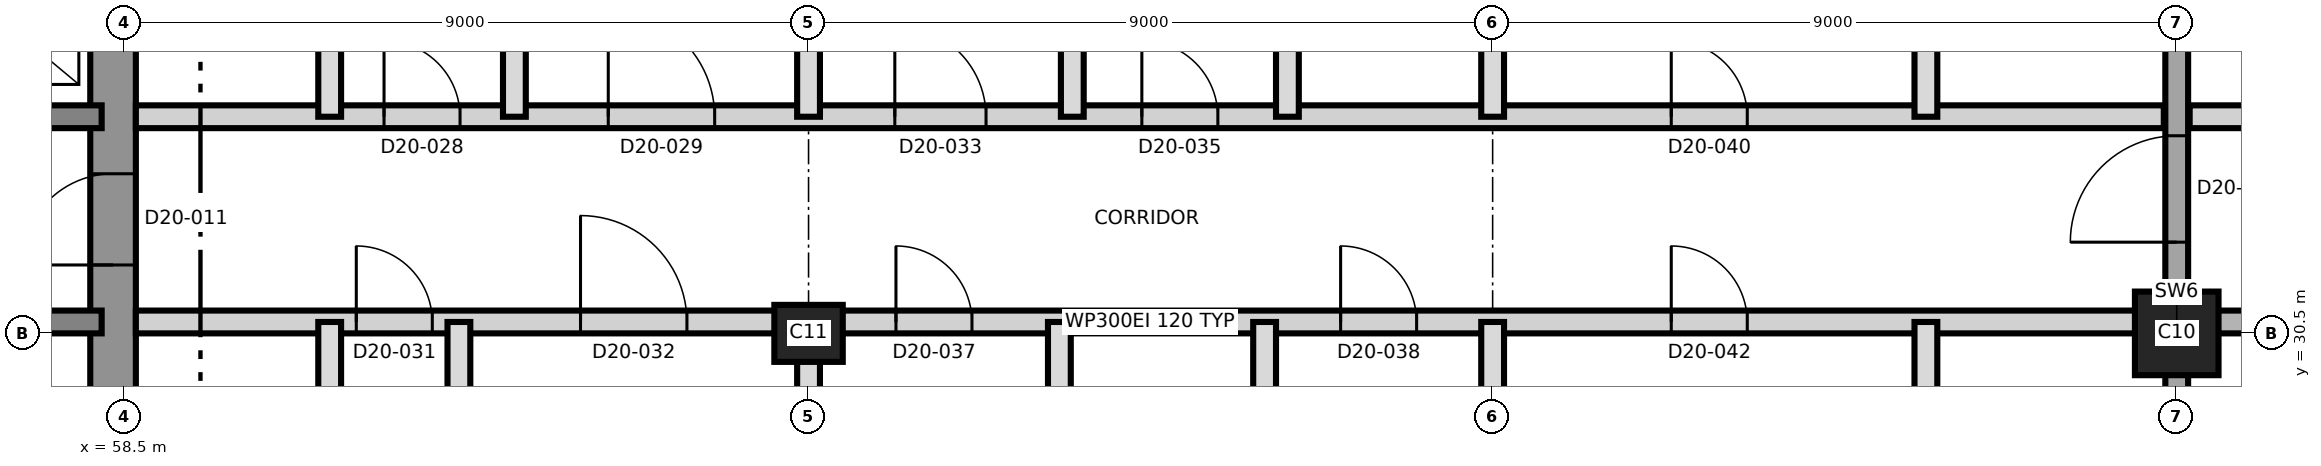
"""IFC4 building model, lengths in metres.
Left out: names, types, materials, properties, quantities, classifications, styles, units other than length and angle.
Written with IfcOpenShell. Run it as: python <this file> out.ifc"""

import sys

from ifc_helpers import new_model, si_unit, direction, frame, frame_2d, origin, origin_2d, place, context, subcontext, project, spatial, rectangle, extrude, element, fill, save


model = new_model("IFC4")
c1 = context("Model", 3, precision=1e-05, world=origin(), true_north=direction((0.0, 1.0)))
c2 = subcontext(c1, "Body", "Model", "MODEL_VIEW")
j1 = project(units=[si_unit("LENGTHUNIT", "METRE"), si_unit("PLANEANGLEUNIT", "RADIAN")], contexts=[c1])
p1 = place(None, origin())
s1 = spatial("IfcSite", under=j1, at=p1, CompositionType="ELEMENT")
p2 = place(p1, origin())
s2 = spatial("IfcBuilding", under=s1, at=p2, CompositionType="ELEMENT")
p3 = place(p2, frame((0.0, 0.0, 182.9)))
s3 = spatial("IfcBuildingStorey", under=s2, at=p3, CompositionType="ELEMENT", Elevation=182.9)
p4 = place(p3, frame((58.35, 21.2, 0.0), z_axis=(0.0, 0.0, 1.0), x_axis=(0.0, 1.0, 0.0)))
e1 = element("IfcWall", 1, at=p4, inside=s3, PredefinedType="SHEAR", context=c2, shape_type="SweptSolid", body=[
    extrude(rectangle(XDim=18.6, YDim=0.6, at=frame_2d((9.3, 0.0))), origin(), (0.0, 0.0, 1.0), 3.7),
])
p5 = place(p4, frame((10.2, 0.0, 0.0)))
e2 = element("IfcOpeningElement", 2, at=p5, cuts=e1, PredefinedType="OPENING", context=c2, shape_type="SweptSolid", body=[
    extrude(rectangle(XDim=1.2, YDim=2.1, at=frame_2d((0.6, 1.05))), frame((0.0, 0.31, 0.0), z_axis=(0.0, -1.0, 0.0), x_axis=(1.0, 0.0, 0.0)), (0.0, 0.0, 1.0), 0.62),
])
p6 = place(p3, frame((31.8, 30.65, 0.0), z_axis=(0.0, 0.0, 1.0), x_axis=(1.0, 0.0, 0.0)))
e3 = element("IfcWall", 3, at=p6, inside=s3, PredefinedType="SHEAR", context=c2, shape_type="SweptSolid", body=[
    extrude(rectangle(XDim=26.4, YDim=0.3, at=frame_2d((13.2, 0.0))), origin(), (0.0, 0.0, 1.0), 3.7),
])
p7 = place(p6, frame((24.7, 0.0, 0.0)))
e4 = element("IfcOpeningElement", 4, at=p7, cuts=e3, PredefinedType="OPENING", context=c2, shape_type="SweptSolid", body=[
    extrude(rectangle(XDim=1.0, YDim=2.1, at=frame_2d((0.5, 1.05))), frame((0.0, 0.16, 0.0), z_axis=(0.0, -1.0, 0.0), x_axis=(1.0, 0.0, 0.0)), (0.0, 0.0, 1.0), 0.32),
])
p8 = place(p6, frame((4.0, 0.0, 0.0)))
e5 = element("IfcOpeningElement", 5, at=p8, cuts=e3, PredefinedType="OPENING", context=c2, shape_type="SweptSolid", body=[
    extrude(rectangle(XDim=1.0, YDim=2.1, at=frame_2d((0.5, 1.05))), frame((0.0, 0.16, 0.0), z_axis=(0.0, -1.0, 0.0), x_axis=(1.0, 0.0, 0.0)), (0.0, 0.0, 1.0), 0.32),
])
p9 = place(p3, frame((31.8, 33.35, 0.0), z_axis=(0.0, 0.0, 1.0), x_axis=(1.0, 0.0, 0.0)))
e6 = element("IfcWall", 6, at=p9, inside=s3, PredefinedType="SHEAR", context=c2, shape_type="SweptSolid", body=[
    extrude(rectangle(XDim=26.4, YDim=0.3, at=frame_2d((13.2, 0.0))), origin(), (0.0, 0.0, 1.0), 3.7),
])
p10 = place(p9, frame((13.85, 0.0, 0.0)))
e7 = element("IfcOpeningElement", 7, at=p10, cuts=e6, PredefinedType="OPENING", context=c2, shape_type="SweptSolid", body=[
    extrude(rectangle(XDim=1.4, YDim=2.1, at=frame_2d((0.7, 1.05))), frame((0.0, 0.16, 0.0), z_axis=(0.0, -1.0, 0.0), x_axis=(1.0, 0.0, 0.0)), (0.0, 0.0, 1.0), 0.32),
])
p11 = place(p9, frame((5.325, 0.0, 0.0)))
e8 = element("IfcOpeningElement", 8, at=p11, cuts=e6, PredefinedType="OPENING", context=c2, shape_type="SweptSolid", body=[
    extrude(rectangle(XDim=1.2, YDim=2.1, at=frame_2d((0.6, 1.05))), frame((0.0, 0.16, 0.0), z_axis=(0.0, -1.0, 0.0), x_axis=(1.0, 0.0, 0.0)), (0.0, 0.0, 1.0), 0.32),
])
p12 = place(p9, frame((19.875, 0.0, 0.0)))
e9 = element("IfcOpeningElement", 9, at=p12, cuts=e6, PredefinedType="OPENING", context=c2, shape_type="SweptSolid", body=[
    extrude(rectangle(XDim=1.2, YDim=2.1, at=frame_2d((0.6, 1.05))), frame((0.0, 0.16, 0.0), z_axis=(0.0, -1.0, 0.0), x_axis=(1.0, 0.0, 0.0)), (0.0, 0.0, 1.0), 0.32),
])
p13 = place(p3, frame((67.5, 30.5, 0.0), z_axis=(0.0, 0.0, 1.0), x_axis=(1.0, 0.0, 0.0)))
e10 = element("IfcColumn", 10, at=p13, inside=s3, PredefinedType="COLUMN", context=c2, shape_type="SweptSolid", body=[
    extrude(rectangle(XDim=0.9, YDim=0.75, at=origin_2d()), origin(), (0.0, 0.0, 1.0), 3.7),
])
p14 = place(p3, frame((85.5, 30.5, 0.0), z_axis=(0.0, 0.0, 1.0), x_axis=(1.0, 0.0, 0.0)))
e11 = element("IfcColumn", 11, at=p14, inside=s3, PredefinedType="COLUMN", context=c2, shape_type="SweptSolid", body=[
    extrude(rectangle(XDim=1.1, YDim=1.1, at=origin_2d()), origin(), (0.0, 0.0, 1.0), 3.7),
])
p15 = place(p3, frame((85.5, 19.17, 0.0), z_axis=(0.0, 0.0, 1.0), x_axis=(0.0, 1.0, 0.0)))
e12 = element("IfcWall", 12, at=p15, inside=s3, PredefinedType="SHEAR", context=c2, shape_type="SweptSolid", body=[
    extrude(rectangle(XDim=22.66, YDim=0.3, at=frame_2d((11.33, 0.0))), origin(), (0.0, 0.0, 1.0), 3.7),
])
p16 = place(p15, frame((12.53, 0.0, 0.0)))
e13 = element("IfcOpeningElement", 13, at=p16, cuts=e12, PredefinedType="OPENING", context=c2, shape_type="SweptSolid", body=[
    extrude(rectangle(XDim=1.4, YDim=2.1, at=frame_2d((0.7, 1.05))), frame((0.0, 0.16, 0.0), z_axis=(0.0, -1.0, 0.0), x_axis=(1.0, 0.0, 0.0)), (0.0, 0.0, 1.0), 0.32),
])
p17 = place(p3, frame((58.65, 30.65, 0.0), z_axis=(0.0, 0.0, 1.0), x_axis=(1.0, 0.0, 0.0)))
e14 = element("IfcWall", 14, at=p17, inside=s3, PredefinedType="PARTITIONING", context=c2, shape_type="SweptSolid", body=[
    extrude(rectangle(XDim=26.68, YDim=0.3, at=frame_2d((13.34, 0.0))), origin(), (0.0, 0.0, 1.0), 3.4),
])
p18 = place(p17, frame((2.9, 0.0, 0.0)))
e15 = element("IfcOpeningElement", 15, at=p18, cuts=e14, PredefinedType="OPENING", context=c2, shape_type="SweptSolid", body=[
    extrude(rectangle(XDim=1.0, YDim=2.1, at=frame_2d((0.5, 1.05))), frame((0.0, 0.16, 0.0), z_axis=(0.0, -1.0, 0.0), x_axis=(1.0, 0.0, 0.0)), (0.0, 0.0, 1.0), 0.32),
])
p19 = place(p17, frame((5.85, 0.0, 0.0)))
e16 = element("IfcOpeningElement", 16, at=p19, cuts=e14, PredefinedType="OPENING", context=c2, shape_type="SweptSolid", body=[
    extrude(rectangle(XDim=1.4, YDim=2.1, at=frame_2d((0.7, 1.05))), frame((0.0, 0.16, 0.0), z_axis=(0.0, -1.0, 0.0), x_axis=(1.0, 0.0, 0.0)), (0.0, 0.0, 1.0), 0.32),
])
p20 = place(p17, frame((10.0, 0.0, 0.0)))
e17 = element("IfcOpeningElement", 17, at=p20, cuts=e14, PredefinedType="OPENING", context=c2, shape_type="SweptSolid", body=[
    extrude(rectangle(XDim=1.0, YDim=2.1, at=frame_2d((0.5, 1.05))), frame((0.0, 0.16, 0.0), z_axis=(0.0, -1.0, 0.0), x_axis=(1.0, 0.0, 0.0)), (0.0, 0.0, 1.0), 0.32),
])
p21 = place(p17, frame((15.85, 0.0, 0.0)))
e18 = element("IfcOpeningElement", 18, at=p21, cuts=e14, PredefinedType="OPENING", context=c2, shape_type="SweptSolid", body=[
    extrude(rectangle(XDim=1.0, YDim=2.1, at=frame_2d((0.5, 1.05))), frame((0.0, 0.16, 0.0), z_axis=(0.0, -1.0, 0.0), x_axis=(1.0, 0.0, 0.0)), (0.0, 0.0, 1.0), 0.32),
])
p22 = place(p17, frame((20.2, 0.0, 0.0)))
e19 = element("IfcOpeningElement", 19, at=p22, cuts=e14, PredefinedType="OPENING", context=c2, shape_type="SweptSolid", body=[
    extrude(rectangle(XDim=1.0, YDim=2.1, at=frame_2d((0.5, 1.05))), frame((0.0, 0.16, 0.0), z_axis=(0.0, -1.0, 0.0), x_axis=(1.0, 0.0, 0.0)), (0.0, 0.0, 1.0), 0.32),
])
p23 = place(p3, frame((85.67, 30.65, 0.0), z_axis=(0.0, 0.0, 1.0), x_axis=(1.0, 0.0, 0.0)))
e20 = element("IfcWall", 20, at=p23, inside=s3, PredefinedType="SHEAR", context=c2, shape_type="SweptSolid", body=[
    extrude(rectangle(XDim=9.58, YDim=0.3, at=frame_2d((4.79, 0.0))), origin(), (0.0, 0.0, 1.0), 3.4),
])
p24 = place(p23, frame((2.08, 0.0, 0.0)))
e21 = element("IfcOpeningElement", 21, at=p24, cuts=e20, PredefinedType="OPENING", context=c2, shape_type="SweptSolid", body=[
    extrude(rectangle(XDim=1.2, YDim=2.1, at=frame_2d((0.6, 1.05))), frame((0.0, 0.16, 0.0), z_axis=(0.0, -1.0, 0.0), x_axis=(1.0, 0.0, 0.0)), (0.0, 0.0, 1.0), 0.32),
])
p25 = place(p23, frame((5.63, 0.0, 0.0)))
e22 = element("IfcOpeningElement", 22, at=p25, cuts=e20, PredefinedType="OPENING", context=c2, shape_type="SweptSolid", body=[
    extrude(rectangle(XDim=1.0, YDim=2.1, at=frame_2d((0.5, 1.05))), frame((0.0, 0.16, 0.0), z_axis=(0.0, -1.0, 0.0), x_axis=(1.0, 0.0, 0.0)), (0.0, 0.0, 1.0), 0.32),
])
p26 = place(p3, frame((58.65, 33.35, 0.0), z_axis=(0.0, 0.0, 1.0), x_axis=(1.0, 0.0, 0.0)))
e23 = element("IfcWall", 23, at=p26, inside=s3, PredefinedType="PARTITIONING", context=c2, shape_type="SweptSolid", body=[
    extrude(rectangle(XDim=26.68, YDim=0.3, at=frame_2d((13.34, 0.0))), origin(), (0.0, 0.0, 1.0), 3.4),
])
p27 = place(p26, frame((3.265, 0.0, 0.0)))
e24 = element("IfcOpeningElement", 24, at=p27, cuts=e23, PredefinedType="OPENING", context=c2, shape_type="SweptSolid", body=[
    extrude(rectangle(XDim=1.0, YDim=2.1, at=frame_2d((0.5, 1.05))), frame((0.0, 0.16, 0.0), z_axis=(0.0, -1.0, 0.0), x_axis=(1.0, 0.0, 0.0)), (0.0, 0.0, 1.0), 0.32),
])
p28 = place(p26, frame((6.215, 0.0, 0.0)))
e25 = element("IfcOpeningElement", 25, at=p28, cuts=e23, PredefinedType="OPENING", context=c2, shape_type="SweptSolid", body=[
    extrude(rectangle(XDim=1.4, YDim=2.1, at=frame_2d((0.7, 1.05))), frame((0.0, 0.16, 0.0), z_axis=(0.0, -1.0, 0.0), x_axis=(1.0, 0.0, 0.0)), (0.0, 0.0, 1.0), 0.32),
])
p29 = place(p26, frame((9.985, 0.0, 0.0)))
e26 = element("IfcOpeningElement", 26, at=p29, cuts=e23, PredefinedType="OPENING", context=c2, shape_type="SweptSolid", body=[
    extrude(rectangle(XDim=1.2, YDim=2.1, at=frame_2d((0.6, 1.05))), frame((0.0, 0.16, 0.0), z_axis=(0.0, -1.0, 0.0), x_axis=(1.0, 0.0, 0.0)), (0.0, 0.0, 1.0), 0.32),
])
p30 = place(p26, frame((13.235, 0.0, 0.0)))
e27 = element("IfcOpeningElement", 27, at=p30, cuts=e23, PredefinedType="OPENING", context=c2, shape_type="SweptSolid", body=[
    extrude(rectangle(XDim=1.0, YDim=2.1, at=frame_2d((0.5, 1.05))), frame((0.0, 0.16, 0.0), z_axis=(0.0, -1.0, 0.0), x_axis=(1.0, 0.0, 0.0)), (0.0, 0.0, 1.0), 0.32),
])
p31 = place(p26, frame((20.2, 0.0, 0.0)))
e28 = element("IfcOpeningElement", 28, at=p31, cuts=e23, PredefinedType="OPENING", context=c2, shape_type="SweptSolid", body=[
    extrude(rectangle(XDim=1.0, YDim=2.1, at=frame_2d((0.5, 1.05))), frame((0.0, 0.16, 0.0), z_axis=(0.0, -1.0, 0.0), x_axis=(1.0, 0.0, 0.0)), (0.0, 0.0, 1.0), 0.32),
])
p32 = place(p3, frame((85.67, 33.35, 0.0), z_axis=(0.0, 0.0, 1.0), x_axis=(1.0, 0.0, 0.0)))
e29 = element("IfcWall", 29, at=p32, inside=s3, PredefinedType="PARTITIONING", context=c2, shape_type="SweptSolid", body=[
    extrude(rectangle(XDim=9.58, YDim=0.3, at=frame_2d((4.79, 0.0))), origin(), (0.0, 0.0, 1.0), 3.4),
])
p33 = place(p32, frame((1.83, 0.0, 0.0)))
e30 = element("IfcOpeningElement", 30, at=p33, cuts=e29, PredefinedType="OPENING", context=c2, shape_type="SweptSolid", body=[
    extrude(rectangle(XDim=1.0, YDim=2.1, at=frame_2d((0.5, 1.05))), frame((0.0, 0.16, 0.0), z_axis=(0.0, -1.0, 0.0), x_axis=(1.0, 0.0, 0.0)), (0.0, 0.0, 1.0), 0.32),
])
p34 = place(p32, frame((5.63, 0.0, 0.0)))
e31 = element("IfcOpeningElement", 31, at=p34, cuts=e29, PredefinedType="OPENING", context=c2, shape_type="SweptSolid", body=[
    extrude(rectangle(XDim=1.0, YDim=2.1, at=frame_2d((0.5, 1.05))), frame((0.0, 0.16, 0.0), z_axis=(0.0, -1.0, 0.0), x_axis=(1.0, 0.0, 0.0)), (0.0, 0.0, 1.0), 0.32),
])
for number, where, z_axis, x_axis in (
    (32, (61.2, 27.45, 0.0), (0.0, 0.0, 1.0), (0.0, 1.0, 0.0)),
    (33, (61.2, 33.35, 0.0), (0.0, 0.0, 1.0), (0.0, 1.0, 0.0)),
):
    element("IfcWall", number, at=place(p3, frame(where, z_axis=z_axis, x_axis=x_axis)), inside=s3, PredefinedType="PARTITIONING", context=c2, shape_type="SweptSolid", body=[
        extrude(rectangle(XDim=3.2, YDim=0.3, at=frame_2d((1.6, 0.0))), origin(), (0.0, 0.0, 1.0), 3.4),
    ])
p35 = place(p3, frame((62.9, 19.17, 0.0), z_axis=(0.0, 0.0, 1.0), x_axis=(0.0, 1.0, 0.0)))
e34 = element("IfcWall", 34, at=p35, inside=s3, PredefinedType="PARTITIONING", context=c2, shape_type="SweptSolid", body=[
    extrude(rectangle(XDim=11.48, YDim=0.3, at=frame_2d((5.74, 0.0))), origin(), (0.0, 0.0, 1.0), 3.4),
])
p36 = place(p3, frame((63.63, 33.35, 0.0), z_axis=(0.0, 0.0, 1.0), x_axis=(0.0, 1.0, 0.0)))
e35 = element("IfcWall", 35, at=p36, inside=s3, PredefinedType="PARTITIONING", context=c2, shape_type="SweptSolid", body=[
    extrude(rectangle(XDim=8.62, YDim=0.3, at=frame_2d((4.31, 0.0))), origin(), (0.0, 0.0, 1.0), 3.4),
])
p37 = place(p3, frame((67.5, 19.17, 0.0), z_axis=(0.0, 0.0, 1.0), x_axis=(0.0, 1.0, 0.0)))
e36 = element("IfcWall", 36, at=p37, inside=s3, PredefinedType="PARTITIONING", context=c2, shape_type="SweptSolid", body=[
    extrude(rectangle(XDim=11.48, YDim=0.3, at=frame_2d((5.74, 0.0))), origin(), (0.0, 0.0, 1.0), 3.4),
])
p38 = place(p3, frame((67.5, 33.35, 0.0), z_axis=(0.0, 0.0, 1.0), x_axis=(0.0, 1.0, 0.0)))
e37 = element("IfcWall", 37, at=p38, inside=s3, PredefinedType="PARTITIONING", context=c2, shape_type="SweptSolid", body=[
    extrude(rectangle(XDim=8.66, YDim=0.3, at=frame_2d((4.33, 0.0))), origin(), (0.0, 0.0, 1.0), 3.4),
])
p39 = place(p3, frame((70.8, 27.45, 0.0), z_axis=(0.0, 0.0, 1.0), x_axis=(0.0, 1.0, 0.0)))
e38 = element("IfcWall", 38, at=p39, inside=s3, PredefinedType="PARTITIONING", context=c2, shape_type="SweptSolid", body=[
    extrude(rectangle(XDim=3.2, YDim=0.3, at=frame_2d((1.6, 0.0))), origin(), (0.0, 0.0, 1.0), 3.4),
])
p40 = place(p3, frame((70.97, 33.35, 0.0), z_axis=(0.0, 0.0, 1.0), x_axis=(0.0, 1.0, 0.0)))
e39 = element("IfcWall", 39, at=p40, inside=s3, PredefinedType="PARTITIONING", context=c2, shape_type="SweptSolid", body=[
    extrude(rectangle(XDim=8.66, YDim=0.3, at=frame_2d((4.33, 0.0))), origin(), (0.0, 0.0, 1.0), 3.4),
])
p41 = place(p3, frame((73.5, 19.17, 0.0), z_axis=(0.0, 0.0, 1.0), x_axis=(0.0, 1.0, 0.0)))
e40 = element("IfcWall", 40, at=p41, inside=s3, PredefinedType="PARTITIONING", context=c2, shape_type="SweptSolid", body=[
    extrude(rectangle(XDim=11.48, YDim=0.3, at=frame_2d((5.74, 0.0))), origin(), (0.0, 0.0, 1.0), 3.4),
])
p42 = place(p3, frame((73.8, 33.35, 0.0), z_axis=(0.0, 0.0, 1.0), x_axis=(0.0, 1.0, 0.0)))
e41 = element("IfcWall", 41, at=p42, inside=s3, PredefinedType="PARTITIONING", context=c2, shape_type="SweptSolid", body=[
    extrude(rectangle(XDim=3.2, YDim=0.3, at=frame_2d((1.6, 0.0))), origin(), (0.0, 0.0, 1.0), 3.4),
])
p43 = place(p3, frame((76.5, 19.17, 0.0), z_axis=(0.0, 0.0, 1.0), x_axis=(0.0, 1.0, 0.0)))
e42 = element("IfcWall", 42, at=p43, inside=s3, PredefinedType="PARTITIONING", context=c2, shape_type="SweptSolid", body=[
    extrude(rectangle(XDim=11.48, YDim=0.3, at=frame_2d((5.74, 0.0))), origin(), (0.0, 0.0, 1.0), 3.4),
])
p44 = place(p3, frame((76.5, 33.35, 0.0), z_axis=(0.0, 0.0, 1.0), x_axis=(0.0, 1.0, 0.0)))
e43 = element("IfcWall", 43, at=p44, inside=s3, PredefinedType="PARTITIONING", context=c2, shape_type="SweptSolid", body=[
    extrude(rectangle(XDim=8.66, YDim=0.3, at=frame_2d((4.33, 0.0))), origin(), (0.0, 0.0, 1.0), 3.4),
])
for number, where, z_axis, x_axis in (
    (44, (82.2, 27.15, 0.0), (0.0, 0.0, 1.0), (0.0, 1.0, 0.0)),
    (45, (82.2, 33.35, 0.0), (0.0, 0.0, 1.0), (0.0, 1.0, 0.0)),
):
    element("IfcWall", number, at=place(p3, frame(where, z_axis=z_axis, x_axis=x_axis)), inside=s3, PredefinedType="PARTITIONING", context=c2, shape_type="SweptSolid", body=[
        extrude(rectangle(XDim=3.5, YDim=0.3, at=frame_2d((1.75, 0.0))), origin(), (0.0, 0.0, 1.0), 3.4),
    ])
p45 = place(p5, origin())
e46 = element("IfcDoor", 46, at=p45, inside=s3, OperationType="SINGLE_SWING_LEFT", PredefinedType="DOOR", context=c2, shape_type="SweptSolid", body=[
    extrude(rectangle(XDim=1.2, YDim=2.1, at=frame_2d((0.6, 1.05))), frame((0.0, 0.025, 0.0), z_axis=(0.0, -1.0, 0.0), x_axis=(1.0, 0.0, 0.0)), (0.0, 0.0, 1.0), 0.05),
])
fill(e2, e46)
p46 = place(p27, origin())
e47 = element("IfcDoor", 47, at=p46, inside=s3, OperationType="SINGLE_SWING_LEFT", PredefinedType="DOOR", context=c2, shape_type="SweptSolid", body=[
    extrude(rectangle(XDim=1.0, YDim=2.1, at=frame_2d((0.5, 1.05))), frame((0.0, 0.025, 0.0), z_axis=(0.0, -1.0, 0.0), x_axis=(1.0, 0.0, 0.0)), (0.0, 0.0, 1.0), 0.05),
])
fill(e24, e47)
p47 = place(p28, origin())
e48 = element("IfcDoor", 48, at=p47, inside=s3, OperationType="SINGLE_SWING_RIGHT", PredefinedType="DOOR", context=c2, shape_type="SweptSolid", body=[
    extrude(rectangle(XDim=1.4, YDim=2.1, at=frame_2d((0.7, 1.05))), frame((0.0, 0.025, 0.0), z_axis=(0.0, -1.0, 0.0), x_axis=(1.0, 0.0, 0.0)), (0.0, 0.0, 1.0), 0.05),
])
fill(e25, e48)
p48 = place(p18, origin())
e49 = element("IfcDoor", 49, at=p48, inside=s3, OperationType="SINGLE_SWING_LEFT", PredefinedType="DOOR", context=c2, shape_type="SweptSolid", body=[
    extrude(rectangle(XDim=1.0, YDim=2.1, at=frame_2d((0.5, 1.05))), frame((0.0, 0.025, 0.0), z_axis=(0.0, -1.0, 0.0), x_axis=(1.0, 0.0, 0.0)), (0.0, 0.0, 1.0), 0.05),
])
fill(e15, e49)
p49 = place(p19, origin())
e50 = element("IfcDoor", 50, at=p49, inside=s3, OperationType="SINGLE_SWING_RIGHT", PredefinedType="DOOR", context=c2, shape_type="SweptSolid", body=[
    extrude(rectangle(XDim=1.4, YDim=2.1, at=frame_2d((0.7, 1.05))), frame((0.0, 0.025, 0.0), z_axis=(0.0, -1.0, 0.0), x_axis=(1.0, 0.0, 0.0)), (0.0, 0.0, 1.0), 0.05),
])
fill(e16, e50)
p50 = place(p29, origin())
e51 = element("IfcDoor", 51, at=p50, inside=s3, OperationType="SINGLE_SWING_LEFT", PredefinedType="DOOR", context=c2, shape_type="SweptSolid", body=[
    extrude(rectangle(XDim=1.2, YDim=2.1, at=frame_2d((0.6, 1.05))), frame((0.0, 0.025, 0.0), z_axis=(0.0, -1.0, 0.0), x_axis=(1.0, 0.0, 0.0)), (0.0, 0.0, 1.0), 0.05),
])
fill(e26, e51)
p51 = place(p30, origin())
e52 = element("IfcDoor", 52, at=p51, inside=s3, OperationType="SINGLE_SWING_LEFT", PredefinedType="DOOR", context=c2, shape_type="SweptSolid", body=[
    extrude(rectangle(XDim=1.0, YDim=2.1, at=frame_2d((0.5, 1.05))), frame((0.0, 0.025, 0.0), z_axis=(0.0, -1.0, 0.0), x_axis=(1.0, 0.0, 0.0)), (0.0, 0.0, 1.0), 0.05),
])
fill(e27, e52)
p52 = place(p20, origin())
e53 = element("IfcDoor", 53, at=p52, inside=s3, OperationType="SINGLE_SWING_LEFT", PredefinedType="DOOR", context=c2, shape_type="SweptSolid", body=[
    extrude(rectangle(XDim=1.0, YDim=2.1, at=frame_2d((0.5, 1.05))), frame((0.0, 0.025, 0.0), z_axis=(0.0, -1.0, 0.0), x_axis=(1.0, 0.0, 0.0)), (0.0, 0.0, 1.0), 0.05),
])
fill(e17, e53)
p53 = place(p21, origin())
e54 = element("IfcDoor", 54, at=p53, inside=s3, OperationType="SINGLE_SWING_RIGHT", PredefinedType="DOOR", context=c2, shape_type="SweptSolid", body=[
    extrude(rectangle(XDim=1.0, YDim=2.1, at=frame_2d((0.5, 1.05))), frame((0.0, 0.025, 0.0), z_axis=(0.0, -1.0, 0.0), x_axis=(1.0, 0.0, 0.0)), (0.0, 0.0, 1.0), 0.05),
])
fill(e18, e54)
p54 = place(p31, origin())
e55 = element("IfcDoor", 55, at=p54, inside=s3, OperationType="SINGLE_SWING_LEFT", PredefinedType="DOOR", context=c2, shape_type="SweptSolid", body=[
    extrude(rectangle(XDim=1.0, YDim=2.1, at=frame_2d((0.5, 1.05))), frame((0.0, 0.025, 0.0), z_axis=(0.0, -1.0, 0.0), x_axis=(1.0, 0.0, 0.0)), (0.0, 0.0, 1.0), 0.05),
])
fill(e28, e55)
p55 = place(p22, origin())
e56 = element("IfcDoor", 56, at=p55, inside=s3, OperationType="SINGLE_SWING_RIGHT", PredefinedType="DOOR", context=c2, shape_type="SweptSolid", body=[
    extrude(rectangle(XDim=1.0, YDim=2.1, at=frame_2d((0.5, 1.05))), frame((0.0, 0.025, 0.0), z_axis=(0.0, -1.0, 0.0), x_axis=(1.0, 0.0, 0.0)), (0.0, 0.0, 1.0), 0.05),
])
fill(e19, e56)
p56 = place(p16, origin())
e57 = element("IfcDoor", 57, at=p56, inside=s3, OperationType="SINGLE_SWING_RIGHT", PredefinedType="DOOR", context=c2, shape_type="SweptSolid", body=[
    extrude(rectangle(XDim=1.4, YDim=2.1, at=frame_2d((0.7, 1.05))), frame((0.0, 0.025, 0.0), z_axis=(0.0, -1.0, 0.0), x_axis=(1.0, 0.0, 0.0)), (0.0, 0.0, 1.0), 0.05),
])
fill(e13, e57)
save(model, sys.argv[1])
